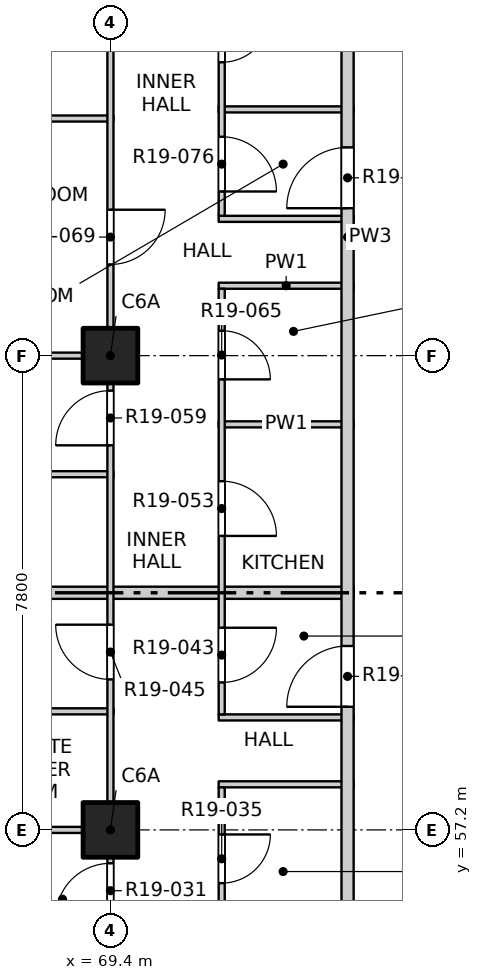
"""IFC4 building model, lengths in metres.
Left out: names, types, materials, properties, quantities, classifications, styles, units other than length and angle.
Written with IfcOpenShell. Run it as: python <this file> out.ifc"""

import sys

from ifc_helpers import new_model, si_unit, direction, frame, frame_2d, origin, origin_2d, place, context, subcontext, project, spatial, rectangle, extrude, element, fill, save


model = new_model("IFC4")
c1 = context("Model", 3, precision=1e-05, world=origin(), true_north=direction((0.0, 1.0)))
c2 = subcontext(c1, "Body", "Model", "MODEL_VIEW")
j1 = project(units=[si_unit("LENGTHUNIT", "METRE"), si_unit("PLANEANGLEUNIT", "RADIAN")], contexts=[c1])
p1 = place(None, origin())
s1 = spatial("IfcSite", under=j1, at=p1, CompositionType="ELEMENT")
p2 = place(p1, origin())
s2 = spatial("IfcBuilding", under=s1, at=p2, CompositionType="ELEMENT")
p3 = place(p2, frame((0.0, 0.0, 197.3)))
s3 = spatial("IfcBuildingStorey", under=s2, at=p3, CompositionType="ELEMENT", Elevation=197.3)
for number, where, z_axis, x_axis in (
    (1, (69.4, 57.2, -0.3), (0.0, 0.0, 1.0), (1.0, 0.0, 0.0)),
    (2, (69.4, 65.0, -0.3), (0.0, 0.0, 1.0), (1.0, 0.0, 0.0)),
):
    element("IfcColumn", number, at=place(p3, frame(where, z_axis=z_axis, x_axis=x_axis)), inside=s3, PredefinedType="COLUMN", context=c2, shape_type="SweptSolid", body=[
        extrude(rectangle(XDim=0.9, YDim=0.9, at=origin_2d()), origin(), (0.0, 0.0, 1.0), 3.45),
    ])
p4 = place(p3, frame((61.9, 57.2, 0.0), z_axis=(0.0, 0.0, 1.0), x_axis=(1.0, 0.0, 0.0)))
e3 = element("IfcWall", 3, at=p4, inside=s3, PredefinedType="PARTITIONING", context=c2, shape_type="SweptSolid", body=[
    extrude(rectangle(XDim=7.55, YDim=0.1, at=frame_2d((3.775, 0.0))), origin(), (0.0, 0.0, 1.0), 3.15),
])
for number, where, z_axis, x_axis in (
    (4, (71.18, 57.95, 0.0), (0.0, 0.0, 1.0), (1.0, 0.0, 0.0)),
    (5, (71.18, 59.05, 0.0), (0.0, 0.0, 1.0), (1.0, 0.0, 0.0)),
):
    element("IfcWall", number, at=place(p3, frame(where, z_axis=z_axis, x_axis=x_axis)), inside=s3, PredefinedType="PARTITIONING", context=c2, shape_type="SweptSolid", body=[
        extrude(rectangle(XDim=2.22, YDim=0.1, at=frame_2d((1.11, 0.0))), origin(), (0.0, 0.0, 1.0), 3.15),
    ])
p5 = place(p3, frame((66.05, 59.15, 0.0), z_axis=(0.0, 0.0, 1.0), x_axis=(1.0, 0.0, 0.0)))
e6 = element("IfcWall", 6, at=p5, inside=s3, PredefinedType="PARTITIONING", context=c2, shape_type="SweptSolid", body=[
    extrude(rectangle(XDim=3.4, YDim=0.1, at=frame_2d((1.7, 0.0))), origin(), (0.0, 0.0, 1.0), 3.15),
])
p6 = place(p3, frame((61.9, 61.1, 0.0), z_axis=(0.0, 0.0, 1.0), x_axis=(1.0, 0.0, 0.0)))
e7 = element("IfcWall", 7, at=p6, inside=s3, PredefinedType="PARTITIONING", context=c2, shape_type="SweptSolid", body=[
    extrude(rectangle(XDim=11.5, YDim=0.2, at=frame_2d((5.75, 0.0))), origin(), (0.0, 0.0, 1.0), 2.55),
])
p7 = place(p3, frame((65.75, 63.05, 0.0), z_axis=(0.0, 0.0, 1.0), x_axis=(1.0, 0.0, 0.0)))
e8 = element("IfcWall", 8, at=p7, inside=s3, PredefinedType="PARTITIONING", context=c2, shape_type="SweptSolid", body=[
    extrude(rectangle(XDim=3.7, YDim=0.1, at=frame_2d((1.85, 0.0))), origin(), (0.0, 0.0, 1.0), 3.15),
])
p8 = place(p3, frame((71.18, 63.87, 0.0), z_axis=(0.0, 0.0, 1.0), x_axis=(1.0, 0.0, 0.0)))
e9 = element("IfcWall", 9, at=p8, inside=s3, PredefinedType="PARTITIONING", context=c2, shape_type="SweptSolid", body=[
    extrude(rectangle(XDim=2.22, YDim=0.1, at=frame_2d((1.11, 0.0))), origin(), (0.0, 0.0, 1.0), 3.15),
])
p9 = place(p3, frame((61.9, 65.0, 0.0), z_axis=(0.0, 0.0, 1.0), x_axis=(1.0, 0.0, 0.0)))
e10 = element("IfcWall", 10, at=p9, inside=s3, PredefinedType="PARTITIONING", context=c2, shape_type="SweptSolid", body=[
    extrude(rectangle(XDim=7.55, YDim=0.1, at=frame_2d((3.775, 0.0))), origin(), (0.0, 0.0, 1.0), 3.15),
])
for number, where, z_axis, x_axis in (
    (11, (71.18, 66.15, 0.0), (0.0, 0.0, 1.0), (1.0, 0.0, 0.0)),
    (12, (71.18, 67.25, 0.0), (0.0, 0.0, 1.0), (1.0, 0.0, 0.0)),
):
    element("IfcWall", number, at=place(p3, frame(where, z_axis=z_axis, x_axis=x_axis)), inside=s3, PredefinedType="PARTITIONING", context=c2, shape_type="SweptSolid", body=[
        extrude(rectangle(XDim=2.22, YDim=0.1, at=frame_2d((1.11, 0.0))), origin(), (0.0, 0.0, 1.0), 3.15),
    ])
p10 = place(p3, frame((61.9, 68.9, 0.0), z_axis=(0.0, 0.0, 1.0), x_axis=(1.0, 0.0, 0.0)))
e13 = element("IfcWall", 13, at=p10, inside=s3, PredefinedType="PARTITIONING", context=c2, shape_type="SweptSolid", body=[
    extrude(rectangle(XDim=7.55, YDim=0.1, at=frame_2d((3.775, 0.0))), origin(), (0.0, 0.0, 1.0), 2.55),
])
p11 = place(p3, frame((71.18, 69.05, 0.0), z_axis=(0.0, 0.0, 1.0), x_axis=(1.0, 0.0, 0.0)))
e14 = element("IfcWall", 14, at=p11, inside=s3, PredefinedType="PARTITIONING", context=c2, shape_type="SweptSolid", body=[
    extrude(rectangle(XDim=2.22, YDim=0.1, at=frame_2d((1.11, 0.0))), origin(), (0.0, 0.0, 1.0), 2.55),
])
p12 = place(p3, frame((69.4, 41.9, 0.0), z_axis=(0.0, 0.0, 1.0), x_axis=(0.0, 1.0, 0.0)))
e15 = element("IfcWall", 15, at=p12, inside=s3, PredefinedType="PARTITIONING", context=c2, shape_type="SweptSolid", body=[
    extrude(rectangle(XDim=46.2, YDim=0.1, at=frame_2d((23.1, 0.0))), origin(), (0.0, 0.0, 1.0), 3.15),
])
p13 = place(p12, frame((1.2, 0.0, 0.0)))
e16 = element("IfcOpeningElement", 16, at=p13, cuts=e15, PredefinedType="OPENING", context=c2, shape_type="SweptSolid", body=[
    extrude(rectangle(XDim=0.9, YDim=2.1, at=frame_2d((0.45, 1.05))), frame((0.0, 0.06, 0.0), z_axis=(0.0, -1.0, 0.0), x_axis=(1.0, 0.0, 0.0)), (0.0, 0.0, 1.0), 0.12),
])
p14 = place(p12, frame((5.1, 0.0, 0.0)))
e17 = element("IfcOpeningElement", 17, at=p14, cuts=e15, PredefinedType="OPENING", context=c2, shape_type="SweptSolid", body=[
    extrude(rectangle(XDim=0.9, YDim=2.1, at=frame_2d((0.45, 1.05))), frame((0.0, 0.06, 0.0), z_axis=(0.0, -1.0, 0.0), x_axis=(1.0, 0.0, 0.0)), (0.0, 0.0, 1.0), 0.12),
])
p15 = place(p12, frame((9.0, 0.0, 0.0)))
e18 = element("IfcOpeningElement", 18, at=p15, cuts=e15, PredefinedType="OPENING", context=c2, shape_type="SweptSolid", body=[
    extrude(rectangle(XDim=0.9, YDim=2.1, at=frame_2d((0.45, 1.05))), frame((0.0, 0.06, 0.0), z_axis=(0.0, -1.0, 0.0), x_axis=(1.0, 0.0, 0.0)), (0.0, 0.0, 1.0), 0.12),
])
p16 = place(p12, frame((13.85, 0.0, 0.0)))
e19 = element("IfcOpeningElement", 19, at=p16, cuts=e15, PredefinedType="OPENING", context=c2, shape_type="SweptSolid", body=[
    extrude(rectangle(XDim=0.9, YDim=2.1, at=frame_2d((0.45, 1.05))), frame((0.0, 0.06, 0.0), z_axis=(0.0, -1.0, 0.0), x_axis=(1.0, 0.0, 0.0)), (0.0, 0.0, 1.0), 0.12),
])
p17 = place(p12, frame((17.775, 0.0, 0.0)))
e20 = element("IfcOpeningElement", 20, at=p17, cuts=e15, PredefinedType="OPENING", context=c2, shape_type="SweptSolid", body=[
    extrude(rectangle(XDim=0.9, YDim=2.1, at=frame_2d((0.45, 1.05))), frame((0.0, 0.06, 0.0), z_axis=(0.0, -1.0, 0.0), x_axis=(1.0, 0.0, 0.0)), (0.0, 0.0, 1.0), 0.12),
])
p18 = place(p12, frame((21.625, 0.0, 0.0)))
e21 = element("IfcOpeningElement", 21, at=p18, cuts=e15, PredefinedType="OPENING", context=c2, shape_type="SweptSolid", body=[
    extrude(rectangle(XDim=0.9, YDim=2.1, at=frame_2d((0.45, 1.05))), frame((0.0, 0.06, 0.0), z_axis=(0.0, -1.0, 0.0), x_axis=(1.0, 0.0, 0.0)), (0.0, 0.0, 1.0), 0.12),
])
p19 = place(p12, frame((24.6, 0.0, 0.0)))
e22 = element("IfcOpeningElement", 22, at=p19, cuts=e15, PredefinedType="OPENING", context=c2, shape_type="SweptSolid", body=[
    extrude(rectangle(XDim=0.9, YDim=2.1, at=frame_2d((0.45, 1.05))), frame((0.0, 0.06, 0.0), z_axis=(0.0, -1.0, 0.0), x_axis=(1.0, 0.0, 0.0)), (0.0, 0.0, 1.0), 0.12),
])
p20 = place(p12, frame((29.425, 0.0, 0.0)))
e23 = element("IfcOpeningElement", 23, at=p20, cuts=e15, PredefinedType="OPENING", context=c2, shape_type="SweptSolid", body=[
    extrude(rectangle(XDim=0.9, YDim=2.1, at=frame_2d((0.45, 1.05))), frame((0.0, 0.06, 0.0), z_axis=(0.0, -1.0, 0.0), x_axis=(1.0, 0.0, 0.0)), (0.0, 0.0, 1.0), 0.12),
])
p21 = place(p12, frame((33.375, 0.0, 0.0)))
e24 = element("IfcOpeningElement", 24, at=p21, cuts=e15, PredefinedType="OPENING", context=c2, shape_type="SweptSolid", body=[
    extrude(rectangle(XDim=0.9, YDim=2.1, at=frame_2d((0.45, 1.05))), frame((0.0, 0.06, 0.0), z_axis=(0.0, -1.0, 0.0), x_axis=(1.0, 0.0, 0.0)), (0.0, 0.0, 1.0), 0.12),
])
p22 = place(p12, frame((37.225, 0.0, 0.0)))
e25 = element("IfcOpeningElement", 25, at=p22, cuts=e15, PredefinedType="OPENING", context=c2, shape_type="SweptSolid", body=[
    extrude(rectangle(XDim=0.9, YDim=2.1, at=frame_2d((0.45, 1.05))), frame((0.0, 0.06, 0.0), z_axis=(0.0, -1.0, 0.0), x_axis=(1.0, 0.0, 0.0)), (0.0, 0.0, 1.0), 0.12),
])
p23 = place(p12, frame((40.2, 0.0, 0.0)))
e26 = element("IfcOpeningElement", 26, at=p23, cuts=e15, PredefinedType="OPENING", context=c2, shape_type="SweptSolid", body=[
    extrude(rectangle(XDim=0.9, YDim=2.1, at=frame_2d((0.45, 1.05))), frame((0.0, 0.06, 0.0), z_axis=(0.0, -1.0, 0.0), x_axis=(1.0, 0.0, 0.0)), (0.0, 0.0, 1.0), 0.12),
])
p24 = place(p12, frame((44.1, 0.0, 0.0)))
e27 = element("IfcOpeningElement", 27, at=p24, cuts=e15, PredefinedType="OPENING", context=c2, shape_type="SweptSolid", body=[
    extrude(rectangle(XDim=0.9, YDim=2.1, at=frame_2d((0.45, 1.05))), frame((0.0, 0.06, 0.0), z_axis=(0.0, -1.0, 0.0), x_axis=(1.0, 0.0, 0.0)), (0.0, 0.0, 1.0), 0.12),
])
p25 = place(p3, frame((71.23, 45.55, 0.0), z_axis=(0.0, 0.0, 1.0), x_axis=(0.0, 1.0, 0.0)))
e28 = element("IfcWall", 28, at=p25, inside=s3, PredefinedType="PARTITIONING", context=c2, shape_type="SweptSolid", body=[
    extrude(rectangle(XDim=12.35, YDim=0.1, at=frame_2d((6.175, 0.0))), origin(), (0.0, 0.0, 1.0), 3.15),
])
p26 = place(p25, frame((1.0, 0.0, 0.0)))
e29 = element("IfcOpeningElement", 29, at=p26, cuts=e28, PredefinedType="OPENING", context=c2, shape_type="SweptSolid", body=[
    extrude(rectangle(XDim=0.8, YDim=2.1, at=frame_2d((0.4, 1.05))), frame((0.0, 0.06, 0.0), z_axis=(0.0, -1.0, 0.0), x_axis=(1.0, 0.0, 0.0)), (0.0, 0.0, 1.0), 0.12),
])
p27 = place(p25, frame((3.3, 0.0, 0.0)))
e30 = element("IfcOpeningElement", 30, at=p27, cuts=e28, PredefinedType="OPENING", context=c2, shape_type="SweptSolid", body=[
    extrude(rectangle(XDim=0.9, YDim=2.1, at=frame_2d((0.45, 1.05))), frame((0.0, 0.06, 0.0), z_axis=(0.0, -1.0, 0.0), x_axis=(1.0, 0.0, 0.0)), (0.0, 0.0, 1.0), 0.12),
])
p28 = place(p25, frame((5.7, 0.0, 0.0)))
e31 = element("IfcOpeningElement", 31, at=p28, cuts=e28, PredefinedType="OPENING", context=c2, shape_type="SweptSolid", body=[
    extrude(rectangle(XDim=0.8, YDim=2.1, at=frame_2d((0.4, 1.05))), frame((0.0, 0.06, 0.0), z_axis=(0.0, -1.0, 0.0), x_axis=(1.0, 0.0, 0.0)), (0.0, 0.0, 1.0), 0.12),
])
p29 = place(p25, frame((8.3, 0.0, 0.0)))
e32 = element("IfcOpeningElement", 32, at=p29, cuts=e28, PredefinedType="OPENING", context=c2, shape_type="SweptSolid", body=[
    extrude(rectangle(XDim=0.9, YDim=2.1, at=frame_2d((0.45, 1.05))), frame((0.0, 0.06, 0.0), z_axis=(0.0, -1.0, 0.0), x_axis=(1.0, 0.0, 0.0)), (0.0, 0.0, 1.0), 0.12),
])
p30 = place(p25, frame((10.775, 0.0, 0.0)))
e33 = element("IfcOpeningElement", 33, at=p30, cuts=e28, PredefinedType="OPENING", context=c2, shape_type="SweptSolid", body=[
    extrude(rectangle(XDim=0.8, YDim=2.1, at=frame_2d((0.4, 1.05))), frame((0.0, 0.06, 0.0), z_axis=(0.0, -1.0, 0.0), x_axis=(1.0, 0.0, 0.0)), (0.0, 0.0, 1.0), 0.12),
])
p31 = place(p3, frame((71.23, 59.1, 0.0), z_axis=(0.0, 0.0, 1.0), x_axis=(0.0, 1.0, 0.0)))
e34 = element("IfcWall", 34, at=p31, inside=s3, PredefinedType="PARTITIONING", context=c2, shape_type="SweptSolid", body=[
    extrude(rectangle(XDim=7.0, YDim=0.1, at=frame_2d((3.5, 0.0))), origin(), (0.0, 0.0, 1.0), 3.15),
])
p32 = place(p31, frame((0.525, 0.0, 0.0)))
e35 = element("IfcOpeningElement", 35, at=p32, cuts=e34, PredefinedType="OPENING", context=c2, shape_type="SweptSolid", body=[
    extrude(rectangle(XDim=0.9, YDim=2.1, at=frame_2d((0.45, 1.05))), frame((0.0, 0.06, 0.0), z_axis=(0.0, -1.0, 0.0), x_axis=(1.0, 0.0, 0.0)), (0.0, 0.0, 1.0), 0.12),
])
p33 = place(p31, frame((2.935, 0.0, 0.0)))
e36 = element("IfcOpeningElement", 36, at=p33, cuts=e34, PredefinedType="OPENING", context=c2, shape_type="SweptSolid", body=[
    extrude(rectangle(XDim=0.9, YDim=2.1, at=frame_2d((0.45, 1.05))), frame((0.0, 0.06, 0.0), z_axis=(0.0, -1.0, 0.0), x_axis=(1.0, 0.0, 0.0)), (0.0, 0.0, 1.0), 0.12),
])
p34 = place(p31, frame((5.51, 0.0, 0.0)))
e37 = element("IfcOpeningElement", 37, at=p34, cuts=e34, PredefinedType="OPENING", context=c2, shape_type="SweptSolid", body=[
    extrude(rectangle(XDim=0.8, YDim=2.1, at=frame_2d((0.4, 1.05))), frame((0.0, 0.06, 0.0), z_axis=(0.0, -1.0, 0.0), x_axis=(1.0, 0.0, 0.0)), (0.0, 0.0, 1.0), 0.12),
])
p35 = place(p3, frame((71.23, 67.3, 0.0), z_axis=(0.0, 0.0, 1.0), x_axis=(0.0, 1.0, 0.0)))
e38 = element("IfcWall", 38, at=p35, inside=s3, PredefinedType="PARTITIONING", context=c2, shape_type="SweptSolid", body=[
    extrude(rectangle(XDim=14.55, YDim=0.1, at=frame_2d((7.275, 0.0))), origin(), (0.0, 0.0, 1.0), 3.15),
])
p36 = place(p35, frame((0.4, 0.0, 0.0)))
e39 = element("IfcOpeningElement", 39, at=p36, cuts=e38, PredefinedType="OPENING", context=c2, shape_type="SweptSolid", body=[
    extrude(rectangle(XDim=0.9, YDim=2.1, at=frame_2d((0.45, 1.05))), frame((0.0, 0.06, 0.0), z_axis=(0.0, -1.0, 0.0), x_axis=(1.0, 0.0, 0.0)), (0.0, 0.0, 1.0), 0.12),
])
p37 = place(p35, frame((2.525, 0.0, 0.0)))
e40 = element("IfcOpeningElement", 40, at=p37, cuts=e38, PredefinedType="OPENING", context=c2, shape_type="SweptSolid", body=[
    extrude(rectangle(XDim=0.8, YDim=2.1, at=frame_2d((0.4, 1.05))), frame((0.0, 0.06, 0.0), z_axis=(0.0, -1.0, 0.0), x_axis=(1.0, 0.0, 0.0)), (0.0, 0.0, 1.0), 0.12),
])
p38 = place(p35, frame((5.15, 0.0, 0.0)))
e41 = element("IfcOpeningElement", 41, at=p38, cuts=e38, PredefinedType="OPENING", context=c2, shape_type="SweptSolid", body=[
    extrude(rectangle(XDim=0.8, YDim=2.1, at=frame_2d((0.4, 1.05))), frame((0.0, 0.06, 0.0), z_axis=(0.0, -1.0, 0.0), x_axis=(1.0, 0.0, 0.0)), (0.0, 0.0, 1.0), 0.12),
])
p39 = place(p35, frame((7.75, 0.0, 0.0)))
e42 = element("IfcOpeningElement", 42, at=p39, cuts=e38, PredefinedType="OPENING", context=c2, shape_type="SweptSolid", body=[
    extrude(rectangle(XDim=0.9, YDim=2.1, at=frame_2d((0.45, 1.05))), frame((0.0, 0.06, 0.0), z_axis=(0.0, -1.0, 0.0), x_axis=(1.0, 0.0, 0.0)), (0.0, 0.0, 1.0), 0.12),
])
p40 = place(p35, frame((9.7, 0.0, 0.0)))
e43 = element("IfcOpeningElement", 43, at=p40, cuts=e38, PredefinedType="OPENING", context=c2, shape_type="SweptSolid", body=[
    extrude(rectangle(XDim=0.9, YDim=2.1, at=frame_2d((0.45, 1.05))), frame((0.0, 0.06, 0.0), z_axis=(0.0, -1.0, 0.0), x_axis=(1.0, 0.0, 0.0)), (0.0, 0.0, 1.0), 0.12),
])
p41 = place(p35, frame((11.2, 0.0, 0.0)))
e44 = element("IfcOpeningElement", 44, at=p41, cuts=e38, PredefinedType="OPENING", context=c2, shape_type="SweptSolid", body=[
    extrude(rectangle(XDim=0.8, YDim=2.1, at=frame_2d((0.4, 1.05))), frame((0.0, 0.06, 0.0), z_axis=(0.0, -1.0, 0.0), x_axis=(1.0, 0.0, 0.0)), (0.0, 0.0, 1.0), 0.12),
])
p42 = place(p35, frame((13.0, 0.0, 0.0)))
e45 = element("IfcOpeningElement", 45, at=p42, cuts=e38, PredefinedType="OPENING", context=c2, shape_type="SweptSolid", body=[
    extrude(rectangle(XDim=0.9, YDim=2.1, at=frame_2d((0.45, 1.05))), frame((0.0, 0.06, 0.0), z_axis=(0.0, -1.0, 0.0), x_axis=(1.0, 0.0, 0.0)), (0.0, 0.0, 1.0), 0.12),
])
p43 = place(p3, frame((73.3, 49.5, 0.0), z_axis=(0.0, 0.0, 1.0), x_axis=(0.0, 1.0, 0.0)))
e46 = element("IfcWall", 46, at=p43, inside=s3, PredefinedType="PARTITIONING", context=c2, shape_type="SweptSolid", body=[
    extrude(rectangle(XDim=34.9, YDim=0.2, at=frame_2d((17.45, 0.0))), origin(), (0.0, 0.0, 1.0), 3.15),
])
p44 = place(p43, frame((9.725, 0.0, 0.0)))
e47 = element("IfcOpeningElement", 47, at=p44, cuts=e46, PredefinedType="OPENING", context=c2, shape_type="SweptSolid", body=[
    extrude(rectangle(XDim=1.0, YDim=2.1, at=frame_2d((0.5, 1.05))), frame((0.0, 0.11, 0.0), z_axis=(0.0, -1.0, 0.0), x_axis=(1.0, 0.0, 0.0)), (0.0, 0.0, 1.0), 0.22),
])
p45 = place(p43, frame((17.925, 0.0, 0.0)))
e48 = element("IfcOpeningElement", 48, at=p45, cuts=e46, PredefinedType="OPENING", context=c2, shape_type="SweptSolid", body=[
    extrude(rectangle(XDim=1.0, YDim=2.1, at=frame_2d((0.5, 1.05))), frame((0.0, 0.11, 0.0), z_axis=(0.0, -1.0, 0.0), x_axis=(1.0, 0.0, 0.0)), (0.0, 0.0, 1.0), 0.22),
])
p46 = place(p43, frame((33.675, 0.0, 0.0)))
e49 = element("IfcOpeningElement", 49, at=p46, cuts=e46, PredefinedType="OPENING", context=c2, shape_type="SweptSolid", body=[
    extrude(rectangle(XDim=1.0, YDim=2.1, at=frame_2d((0.5, 1.05))), frame((0.0, 0.11, 0.0), z_axis=(0.0, -1.0, 0.0), x_axis=(1.0, 0.0, 0.0)), (0.0, 0.0, 1.0), 0.22),
])
p47 = place(p16, origin())
e50 = element("IfcDoor", 50, at=p47, inside=s3, OperationType="SINGLE_SWING_LEFT", PredefinedType="DOOR", context=c2, shape_type="SweptSolid", body=[
    extrude(rectangle(XDim=0.9, YDim=2.1, at=frame_2d((0.45, 1.05))), frame((0.0, 0.025, 0.0), z_axis=(0.0, -1.0, 0.0), x_axis=(1.0, 0.0, 0.0)), (0.0, 0.0, 1.0), 0.05),
])
fill(e19, e50)
p48 = place(p30, origin())
e51 = element("IfcDoor", 51, at=p48, inside=s3, OperationType="SINGLE_SWING_LEFT", PredefinedType="DOOR", context=c2, shape_type="SweptSolid", body=[
    extrude(rectangle(XDim=0.8, YDim=2.1, at=frame_2d((0.4, 1.05))), frame((0.0, 0.025, 0.0), z_axis=(0.0, -1.0, 0.0), x_axis=(1.0, 0.0, 0.0)), (0.0, 0.0, 1.0), 0.05),
])
fill(e33, e51)
p49 = place(p44, origin())
e52 = element("IfcDoor", 52, at=p49, inside=s3, OperationType="SINGLE_SWING_RIGHT", PredefinedType="DOOR", context=c2, shape_type="SweptSolid", body=[
    extrude(rectangle(XDim=1.0, YDim=2.1, at=frame_2d((0.5, 1.05))), frame((0.0, 0.025, 0.0), z_axis=(0.0, -1.0, 0.0), x_axis=(1.0, 0.0, 0.0)), (0.0, 0.0, 1.0), 0.05),
])
fill(e47, e52)
p50 = place(p32, origin())
e53 = element("IfcDoor", 53, at=p50, inside=s3, OperationType="SINGLE_SWING_LEFT", PredefinedType="DOOR", context=c2, shape_type="SweptSolid", body=[
    extrude(rectangle(XDim=0.9, YDim=2.1, at=frame_2d((0.45, 1.05))), frame((0.0, 0.025, 0.0), z_axis=(0.0, -1.0, 0.0), x_axis=(1.0, 0.0, 0.0)), (0.0, 0.0, 1.0), 0.05),
])
fill(e35, e53)
p51 = place(p17, origin())
e54 = element("IfcDoor", 54, at=p51, inside=s3, OperationType="SINGLE_SWING_RIGHT", PredefinedType="DOOR", context=c2, shape_type="SweptSolid", body=[
    extrude(rectangle(XDim=0.9, YDim=2.1, at=frame_2d((0.45, 1.05))), frame((0.0, 0.025, 0.0), z_axis=(0.0, -1.0, 0.0), x_axis=(1.0, 0.0, 0.0)), (0.0, 0.0, 1.0), 0.05),
])
fill(e20, e54)
p52 = place(p33, origin())
e55 = element("IfcDoor", 55, at=p52, inside=s3, OperationType="SINGLE_SWING_RIGHT", PredefinedType="DOOR", context=c2, shape_type="SweptSolid", body=[
    extrude(rectangle(XDim=0.9, YDim=2.1, at=frame_2d((0.45, 1.05))), frame((0.0, 0.025, 0.0), z_axis=(0.0, -1.0, 0.0), x_axis=(1.0, 0.0, 0.0)), (0.0, 0.0, 1.0), 0.05),
])
fill(e36, e55)
p53 = place(p18, origin())
e56 = element("IfcDoor", 56, at=p53, inside=s3, OperationType="SINGLE_SWING_LEFT", PredefinedType="DOOR", context=c2, shape_type="SweptSolid", body=[
    extrude(rectangle(XDim=0.9, YDim=2.1, at=frame_2d((0.45, 1.05))), frame((0.0, 0.025, 0.0), z_axis=(0.0, -1.0, 0.0), x_axis=(1.0, 0.0, 0.0)), (0.0, 0.0, 1.0), 0.05),
])
fill(e21, e56)
p54 = place(p34, origin())
e57 = element("IfcDoor", 57, at=p54, inside=s3, OperationType="SINGLE_SWING_RIGHT", PredefinedType="DOOR", context=c2, shape_type="SweptSolid", body=[
    extrude(rectangle(XDim=0.8, YDim=2.1, at=frame_2d((0.4, 1.05))), frame((0.0, 0.025, 0.0), z_axis=(0.0, -1.0, 0.0), x_axis=(1.0, 0.0, 0.0)), (0.0, 0.0, 1.0), 0.05),
])
fill(e37, e57)
p55 = place(p19, origin())
e58 = element("IfcDoor", 58, at=p55, inside=s3, OperationType="SINGLE_SWING_LEFT", PredefinedType="DOOR", context=c2, shape_type="SweptSolid", body=[
    extrude(rectangle(XDim=0.9, YDim=2.1, at=frame_2d((0.45, 1.05))), frame((0.0, 0.025, 0.0), z_axis=(0.0, -1.0, 0.0), x_axis=(1.0, 0.0, 0.0)), (0.0, 0.0, 1.0), 0.05),
])
fill(e22, e58)
p56 = place(p45, origin())
e59 = element("IfcDoor", 59, at=p56, inside=s3, OperationType="SINGLE_SWING_RIGHT", PredefinedType="DOOR", context=c2, shape_type="SweptSolid", body=[
    extrude(rectangle(XDim=1.0, YDim=2.1, at=frame_2d((0.5, 1.05))), frame((0.0, 0.025, 0.0), z_axis=(0.0, -1.0, 0.0), x_axis=(1.0, 0.0, 0.0)), (0.0, 0.0, 1.0), 0.05),
])
fill(e48, e59)
p57 = place(p36, origin())
e60 = element("IfcDoor", 60, at=p57, inside=s3, OperationType="SINGLE_SWING_RIGHT", PredefinedType="DOOR", context=c2, shape_type="SweptSolid", body=[
    extrude(rectangle(XDim=0.9, YDim=2.1, at=frame_2d((0.45, 1.05))), frame((0.0, 0.025, 0.0), z_axis=(0.0, -1.0, 0.0), x_axis=(1.0, 0.0, 0.0)), (0.0, 0.0, 1.0), 0.05),
])
fill(e39, e60)
p58 = place(p37, origin())
e61 = element("IfcDoor", 61, at=p58, inside=s3, OperationType="SINGLE_SWING_LEFT", PredefinedType="DOOR", context=c2, shape_type="SweptSolid", body=[
    extrude(rectangle(XDim=0.8, YDim=2.1, at=frame_2d((0.4, 1.05))), frame((0.0, 0.025, 0.0), z_axis=(0.0, -1.0, 0.0), x_axis=(1.0, 0.0, 0.0)), (0.0, 0.0, 1.0), 0.05),
])
fill(e40, e61)
save(model, sys.argv[1])
